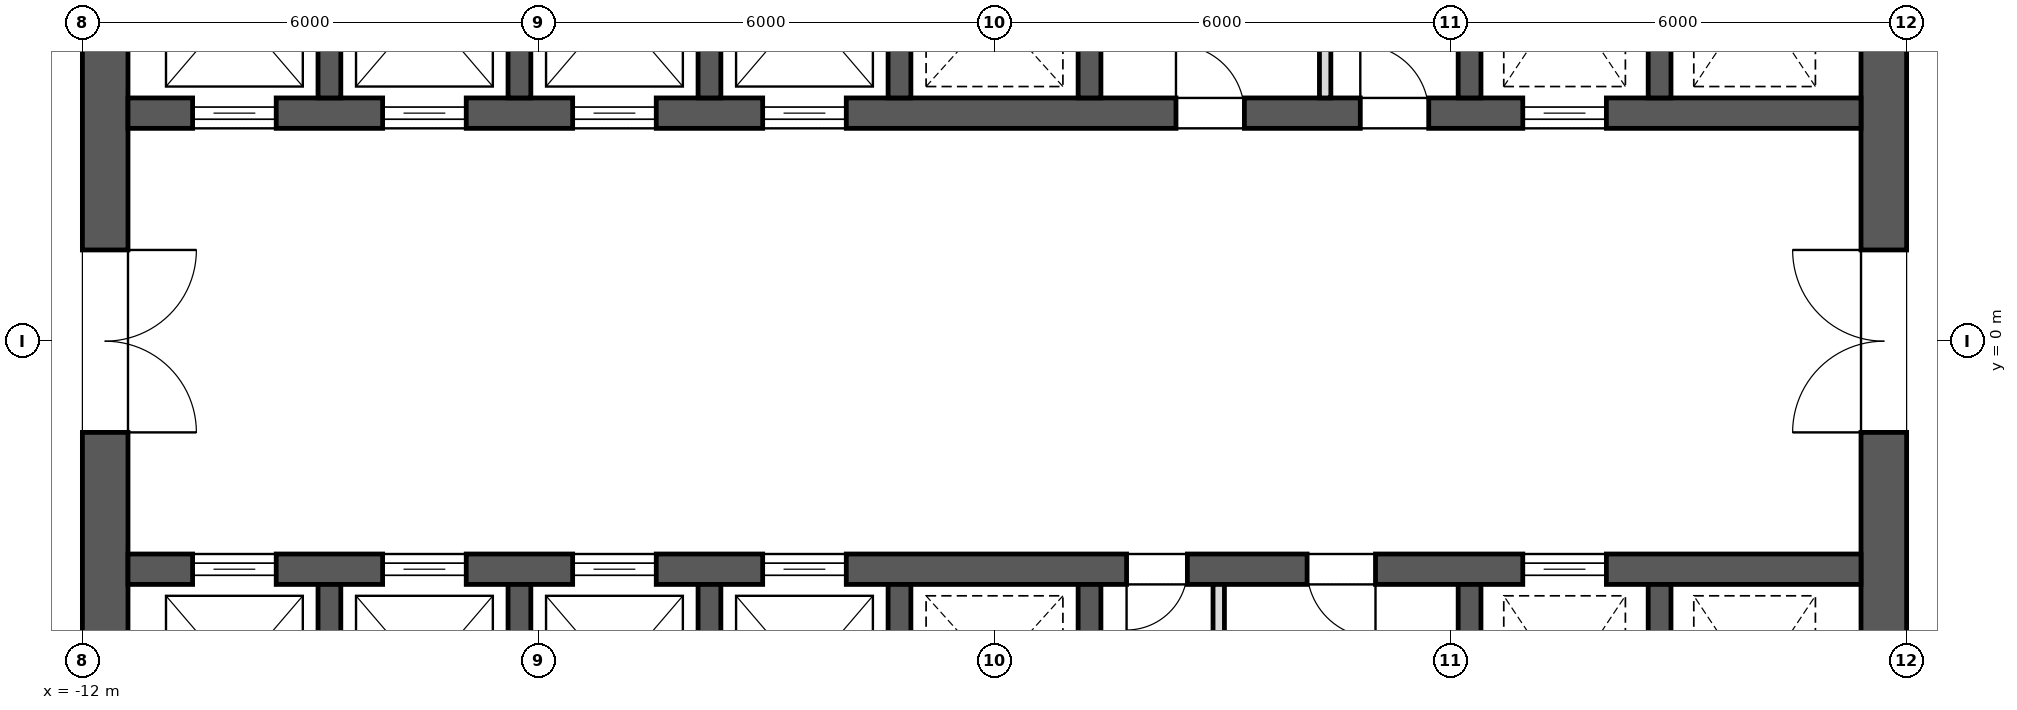
"""IFC4 building model, lengths in metres.
Left out: names, types, materials, properties, quantities, classifications, styles, units other than length and angle.
Written with IfcOpenShell. Run it as: python <this file> out.ifc"""

import sys

from ifc_helpers import new_model, si_unit, direction, frame, frame_2d, origin, place, context, subcontext, project, spatial, rectangle, extrude, element, fill, save


model = new_model("IFC4")
c1 = context("Model", 3, precision=1e-05, world=origin(), true_north=direction((0.0, 1.0)))
c2 = subcontext(c1, "Body", "Model", "MODEL_VIEW")
j1 = project(units=[si_unit("LENGTHUNIT", "METRE"), si_unit("PLANEANGLEUNIT", "RADIAN")], contexts=[c1])
p1 = place(None, origin())
s1 = spatial("IfcSite", under=j1, at=p1, CompositionType="ELEMENT")
p2 = place(p1, origin())
s2 = spatial("IfcBuilding", under=s1, at=p2, CompositionType="ELEMENT")
p3 = place(p2, frame((0.0, 0.0, 186.9)))
s3 = spatial("IfcBuildingStorey", under=s2, at=p3, CompositionType="ELEMENT", Elevation=186.9)
p4 = place(p3, frame((11.7, -11.4, 0.0), z_axis=(0.0, 0.0, 1.0), x_axis=(0.0, 1.0, 0.0)))
e1 = element("IfcWall", 1, at=p4, inside=s3, PredefinedType="SHEAR", context=c2, shape_type="SweptSolid", body=[
    extrude(rectangle(XDim=22.8, YDim=0.6, at=frame_2d((11.4, 0.0))), origin(), (0.0, 0.0, 1.0), 4.0),
])
p5 = place(p4, frame((10.2, 0.0, 0.0)))
e2 = element("IfcOpeningElement", 2, at=p5, cuts=e1, PredefinedType="OPENING", context=c2, shape_type="SweptSolid", body=[
    extrude(rectangle(XDim=2.4, YDim=2.1, at=frame_2d((1.2, 1.05))), frame((0.0, 0.312, 0.0), z_axis=(0.0, -1.0, 0.0), x_axis=(1.0, 0.0, 0.0)), (0.0, 0.0, 1.0), 0.624),
])
p6 = place(p4, frame((19.5, 0.0, 0.0)))
e3 = element("IfcOpeningElement", 3, at=p6, cuts=e1, PredefinedType="OPENING", context=c2, shape_type="SweptSolid", body=[
    extrude(rectangle(XDim=1.2, YDim=2.1, at=frame_2d((0.6, 1.05))), frame((0.0, 0.312, 0.0), z_axis=(0.0, -1.0, 0.0), x_axis=(1.0, 0.0, 0.0)), (0.0, 0.0, 1.0), 0.624),
])
p7 = place(p4, frame((2.1, 0.0, 0.0)))
e4 = element("IfcOpeningElement", 4, at=p7, cuts=e1, PredefinedType="OPENING", context=c2, shape_type="SweptSolid", body=[
    extrude(rectangle(XDim=1.2, YDim=2.1, at=frame_2d((0.6, 1.05))), frame((0.0, 0.312, 0.0), z_axis=(0.0, -1.0, 0.0), x_axis=(1.0, 0.0, 0.0)), (0.0, 0.0, 1.0), 0.624),
])
p8 = place(p3, frame((-11.7, -11.4, 0.0), z_axis=(0.0, 0.0, 1.0), x_axis=(0.0, 1.0, 0.0)))
e5 = element("IfcWall", 5, at=p8, inside=s3, PredefinedType="SHEAR", context=c2, shape_type="SweptSolid", body=[
    extrude(rectangle(XDim=22.8, YDim=0.6, at=frame_2d((11.4, 0.0))), origin(), (0.0, 0.0, 1.0), 4.0),
])
p9 = place(p8, frame((10.2, 0.0, 0.0)))
e6 = element("IfcOpeningElement", 6, at=p9, cuts=e5, PredefinedType="OPENING", context=c2, shape_type="SweptSolid", body=[
    extrude(rectangle(XDim=2.4, YDim=2.1, at=frame_2d((1.2, 1.05))), frame((0.0, 0.312, 0.0), z_axis=(0.0, -1.0, 0.0), x_axis=(1.0, 0.0, 0.0)), (0.0, 0.0, 1.0), 0.624),
])
p10 = place(p8, frame((18.925, 0.0, 0.0)))
e7 = element("IfcOpeningElement", 7, at=p10, cuts=e5, PredefinedType="OPENING", context=c2, shape_type="SweptSolid", body=[
    extrude(rectangle(XDim=1.2, YDim=2.1, at=frame_2d((0.6, 1.05))), frame((0.0, 0.312, 0.0), z_axis=(0.0, -1.0, 0.0), x_axis=(1.0, 0.0, 0.0)), (0.0, 0.0, 1.0), 0.624),
])
p11 = place(p8, frame((2.675, 0.0, 0.0)))
e8 = element("IfcOpeningElement", 8, at=p11, cuts=e5, PredefinedType="OPENING", context=c2, shape_type="SweptSolid", body=[
    extrude(rectangle(XDim=1.2, YDim=2.1, at=frame_2d((0.6, 1.05))), frame((0.0, 0.312, 0.0), z_axis=(0.0, -1.0, 0.0), x_axis=(1.0, 0.0, 0.0)), (0.0, 0.0, 1.0), 0.624),
])
p12 = place(p3, frame((-11.4, 3.0, 0.0), z_axis=(0.0, 0.0, 1.0), x_axis=(1.0, 0.0, 0.0)))
e9 = element("IfcWall", 9, at=p12, inside=s3, PredefinedType="SHEAR", context=c2, shape_type="SweptSolid", body=[
    extrude(rectangle(XDim=22.8, YDim=0.4, at=frame_2d((11.4, 0.0))), origin(), (0.0, 0.0, 1.0), 4.0),
])
p13 = place(p12, frame((0.85, 0.0, 0.0)))
e10 = element("IfcOpeningElement", 10, at=p13, cuts=e9, PredefinedType="OPENING", context=c2, shape_type="SweptSolid", body=[
    extrude(rectangle(XDim=1.1, YDim=2.1, at=frame_2d((0.55, 1.05))), frame((0.0, 0.212, 0.0), z_axis=(0.0, -1.0, 0.0), x_axis=(1.0, 0.0, 0.0)), (0.0, 0.0, 1.0), 0.424),
])
p14 = place(p12, frame((3.35, 0.0, 0.0)))
e11 = element("IfcOpeningElement", 11, at=p14, cuts=e9, PredefinedType="OPENING", context=c2, shape_type="SweptSolid", body=[
    extrude(rectangle(XDim=1.1, YDim=2.1, at=frame_2d((0.55, 1.05))), frame((0.0, 0.212, 0.0), z_axis=(0.0, -1.0, 0.0), x_axis=(1.0, 0.0, 0.0)), (0.0, 0.0, 1.0), 0.424),
])
p15 = place(p12, frame((5.85, 0.0, 0.0)))
e12 = element("IfcOpeningElement", 12, at=p15, cuts=e9, PredefinedType="OPENING", context=c2, shape_type="SweptSolid", body=[
    extrude(rectangle(XDim=1.1, YDim=2.1, at=frame_2d((0.55, 1.05))), frame((0.0, 0.212, 0.0), z_axis=(0.0, -1.0, 0.0), x_axis=(1.0, 0.0, 0.0)), (0.0, 0.0, 1.0), 0.424),
])
p16 = place(p12, frame((8.35, 0.0, 0.0)))
e13 = element("IfcOpeningElement", 13, at=p16, cuts=e9, PredefinedType="OPENING", context=c2, shape_type="SweptSolid", body=[
    extrude(rectangle(XDim=1.1, YDim=2.1, at=frame_2d((0.55, 1.05))), frame((0.0, 0.212, 0.0), z_axis=(0.0, -1.0, 0.0), x_axis=(1.0, 0.0, 0.0)), (0.0, 0.0, 1.0), 0.424),
])
p17 = place(p12, frame((18.35, 0.0, 0.0)))
e14 = element("IfcOpeningElement", 14, at=p17, cuts=e9, PredefinedType="OPENING", context=c2, shape_type="SweptSolid", body=[
    extrude(rectangle(XDim=1.1, YDim=2.1, at=frame_2d((0.55, 1.05))), frame((0.0, 0.212, 0.0), z_axis=(0.0, -1.0, 0.0), x_axis=(1.0, 0.0, 0.0)), (0.0, 0.0, 1.0), 0.424),
])
p18 = place(p12, frame((13.788, 0.0, 0.0)))
e15 = element("IfcOpeningElement", 15, at=p18, cuts=e9, PredefinedType="OPENING", context=c2, shape_type="SweptSolid", body=[
    extrude(rectangle(XDim=0.9, YDim=2.1, at=frame_2d((0.45, 1.05))), frame((0.0, 0.212, 0.0), z_axis=(0.0, -1.0, 0.0), x_axis=(1.0, 0.0, 0.0)), (0.0, 0.0, 1.0), 0.424),
])
p19 = place(p12, frame((16.212, 0.0, 0.0)))
e16 = element("IfcOpeningElement", 16, at=p19, cuts=e9, PredefinedType="OPENING", context=c2, shape_type="SweptSolid", body=[
    extrude(rectangle(XDim=0.9, YDim=2.1, at=frame_2d((0.45, 1.05))), frame((0.0, 0.212, 0.0), z_axis=(0.0, -1.0, 0.0), x_axis=(1.0, 0.0, 0.0)), (0.0, 0.0, 1.0), 0.424),
])
for number, where, z_axis, x_axis in (
    (17, (-8.75, 3.2, 0.0), (0.0, 0.0, 1.0), (0.0, 1.0, 0.0)),
    (18, (-6.25, 3.2, 0.0), (0.0, 0.0, 1.0), (0.0, 1.0, 0.0)),
    (19, (-3.75, 3.2, 0.0), (0.0, 0.0, 1.0), (0.0, 1.0, 0.0)),
    (20, (-1.25, 3.2, 0.0), (0.0, 0.0, 1.0), (0.0, 1.0, 0.0)),
    (21, (1.25, 3.2, 0.0), (0.0, 0.0, 1.0), (0.0, 1.0, 0.0)),
    (22, (6.25, 3.2, 0.0), (0.0, 0.0, 1.0), (0.0, 1.0, 0.0)),
    (23, (8.75, 3.2, 0.0), (0.0, 0.0, 1.0), (0.0, 1.0, 0.0)),
):
    element("IfcWall", number, at=place(p3, frame(where, z_axis=z_axis, x_axis=x_axis)), inside=s3, PredefinedType="SHEAR", context=c2, shape_type="SweptSolid", body=[
        extrude(rectangle(XDim=2.9, YDim=0.3, at=frame_2d((1.45, 0.0))), origin(), (0.0, 0.0, 1.0), 4.0),
    ])
p20 = place(p3, frame((-11.4, -3.0, 0.0), z_axis=(0.0, 0.0, 1.0), x_axis=(1.0, 0.0, 0.0)))
e24 = element("IfcWall", 24, at=p20, inside=s3, PredefinedType="SHEAR", context=c2, shape_type="SweptSolid", body=[
    extrude(rectangle(XDim=22.8, YDim=0.4, at=frame_2d((11.4, 0.0))), origin(), (0.0, 0.0, 1.0), 4.0),
])
p21 = place(p20, frame((0.85, 0.0, 0.0)))
e25 = element("IfcOpeningElement", 25, at=p21, cuts=e24, PredefinedType="OPENING", context=c2, shape_type="SweptSolid", body=[
    extrude(rectangle(XDim=1.1, YDim=2.1, at=frame_2d((0.55, 1.05))), frame((0.0, 0.212, 0.0), z_axis=(0.0, -1.0, 0.0), x_axis=(1.0, 0.0, 0.0)), (0.0, 0.0, 1.0), 0.424),
])
p22 = place(p20, frame((3.35, 0.0, 0.0)))
e26 = element("IfcOpeningElement", 26, at=p22, cuts=e24, PredefinedType="OPENING", context=c2, shape_type="SweptSolid", body=[
    extrude(rectangle(XDim=1.1, YDim=2.1, at=frame_2d((0.55, 1.05))), frame((0.0, 0.212, 0.0), z_axis=(0.0, -1.0, 0.0), x_axis=(1.0, 0.0, 0.0)), (0.0, 0.0, 1.0), 0.424),
])
p23 = place(p20, frame((5.85, 0.0, 0.0)))
e27 = element("IfcOpeningElement", 27, at=p23, cuts=e24, PredefinedType="OPENING", context=c2, shape_type="SweptSolid", body=[
    extrude(rectangle(XDim=1.1, YDim=2.1, at=frame_2d((0.55, 1.05))), frame((0.0, 0.212, 0.0), z_axis=(0.0, -1.0, 0.0), x_axis=(1.0, 0.0, 0.0)), (0.0, 0.0, 1.0), 0.424),
])
p24 = place(p20, frame((8.35, 0.0, 0.0)))
e28 = element("IfcOpeningElement", 28, at=p24, cuts=e24, PredefinedType="OPENING", context=c2, shape_type="SweptSolid", body=[
    extrude(rectangle(XDim=1.1, YDim=2.1, at=frame_2d((0.55, 1.05))), frame((0.0, 0.212, 0.0), z_axis=(0.0, -1.0, 0.0), x_axis=(1.0, 0.0, 0.0)), (0.0, 0.0, 1.0), 0.424),
])
p25 = place(p20, frame((18.35, 0.0, 0.0)))
e29 = element("IfcOpeningElement", 29, at=p25, cuts=e24, PredefinedType="OPENING", context=c2, shape_type="SweptSolid", body=[
    extrude(rectangle(XDim=1.1, YDim=2.1, at=frame_2d((0.55, 1.05))), frame((0.0, 0.212, 0.0), z_axis=(0.0, -1.0, 0.0), x_axis=(1.0, 0.0, 0.0)), (0.0, 0.0, 1.0), 0.424),
])
p26 = place(p20, frame((13.137, 0.0, 0.0)))
e30 = element("IfcOpeningElement", 30, at=p26, cuts=e24, PredefinedType="OPENING", context=c2, shape_type="SweptSolid", body=[
    extrude(rectangle(XDim=0.8, YDim=2.1, at=frame_2d((0.4, 1.05))), frame((0.0, 0.212, 0.0), z_axis=(0.0, -1.0, 0.0), x_axis=(1.0, 0.0, 0.0)), (0.0, 0.0, 1.0), 0.424),
])
p27 = place(p20, frame((15.512, 0.0, 0.0)))
e31 = element("IfcOpeningElement", 31, at=p27, cuts=e24, PredefinedType="OPENING", context=c2, shape_type="SweptSolid", body=[
    extrude(rectangle(XDim=0.9, YDim=2.1, at=frame_2d((0.45, 1.05))), frame((0.0, 0.212, 0.0), z_axis=(0.0, -1.0, 0.0), x_axis=(1.0, 0.0, 0.0)), (0.0, 0.0, 1.0), 0.424),
])
for number, where, z_axis, x_axis in (
    (32, (-8.75, -6.1, 0.0), (0.0, 0.0, 1.0), (0.0, 1.0, 0.0)),
    (33, (-6.25, -6.1, 0.0), (0.0, 0.0, 1.0), (0.0, 1.0, 0.0)),
    (34, (-3.75, -6.1, 0.0), (0.0, 0.0, 1.0), (0.0, 1.0, 0.0)),
    (35, (-1.25, -6.1, 0.0), (0.0, 0.0, 1.0), (0.0, 1.0, 0.0)),
    (36, (1.25, -6.1, 0.0), (0.0, 0.0, 1.0), (0.0, 1.0, 0.0)),
    (37, (6.25, -6.1, 0.0), (0.0, 0.0, 1.0), (0.0, 1.0, 0.0)),
    (38, (8.75, -6.1, 0.0), (0.0, 0.0, 1.0), (0.0, 1.0, 0.0)),
):
    element("IfcWall", number, at=place(p3, frame(where, z_axis=z_axis, x_axis=x_axis)), inside=s3, PredefinedType="SHEAR", context=c2, shape_type="SweptSolid", body=[
        extrude(rectangle(XDim=2.9, YDim=0.3, at=frame_2d((1.45, 0.0))), origin(), (0.0, 0.0, 1.0), 4.0),
    ])
for number, where, z_axis, x_axis in (
    (39, (4.35, 3.2, 0.0), (0.0, 0.0, 1.0), (0.0, 1.0, 0.0)),
    (40, (2.95, -6.1, 0.0), (0.0, 0.0, 1.0), (0.0, 1.0, 0.0)),
):
    element("IfcWall", number, at=place(p3, frame(where, z_axis=z_axis, x_axis=x_axis)), inside=s3, PredefinedType="PARTITIONING", context=c2, shape_type="SweptSolid", body=[
        extrude(rectangle(XDim=2.9, YDim=0.15, at=frame_2d((1.45, 0.0))), origin(), (0.0, 0.0, 1.0), 3.7),
    ])
p28 = place(p13, origin())
e41 = element("IfcDoor", 41, at=p28, inside=s3, OperationType="SLIDING_TO_LEFT", PredefinedType="DOOR", context=c2, shape_type="SweptSolid", body=[
    extrude(rectangle(XDim=1.1, YDim=2.1, at=frame_2d((0.55, 1.05))), frame((0.0, 0.025, 0.0), z_axis=(0.0, -1.0, 0.0), x_axis=(1.0, 0.0, 0.0)), (0.0, 0.0, 1.0), 0.05),
])
fill(e10, e41)
p29 = place(p14, origin())
e42 = element("IfcDoor", 42, at=p29, inside=s3, OperationType="SLIDING_TO_LEFT", PredefinedType="DOOR", context=c2, shape_type="SweptSolid", body=[
    extrude(rectangle(XDim=1.1, YDim=2.1, at=frame_2d((0.55, 1.05))), frame((0.0, 0.025, 0.0), z_axis=(0.0, -1.0, 0.0), x_axis=(1.0, 0.0, 0.0)), (0.0, 0.0, 1.0), 0.05),
])
fill(e11, e42)
p30 = place(p21, origin())
e43 = element("IfcDoor", 43, at=p30, inside=s3, OperationType="SLIDING_TO_LEFT", PredefinedType="DOOR", context=c2, shape_type="SweptSolid", body=[
    extrude(rectangle(XDim=1.1, YDim=2.1, at=frame_2d((0.55, 1.05))), frame((0.0, 0.025, 0.0), z_axis=(0.0, -1.0, 0.0), x_axis=(1.0, 0.0, 0.0)), (0.0, 0.0, 1.0), 0.05),
])
fill(e25, e43)
p31 = place(p22, origin())
e44 = element("IfcDoor", 44, at=p31, inside=s3, OperationType="SLIDING_TO_LEFT", PredefinedType="DOOR", context=c2, shape_type="SweptSolid", body=[
    extrude(rectangle(XDim=1.1, YDim=2.1, at=frame_2d((0.55, 1.05))), frame((0.0, 0.025, 0.0), z_axis=(0.0, -1.0, 0.0), x_axis=(1.0, 0.0, 0.0)), (0.0, 0.0, 1.0), 0.05),
])
fill(e26, e44)
p32 = place(p15, origin())
e45 = element("IfcDoor", 45, at=p32, inside=s3, OperationType="SLIDING_TO_LEFT", PredefinedType="DOOR", context=c2, shape_type="SweptSolid", body=[
    extrude(rectangle(XDim=1.1, YDim=2.1, at=frame_2d((0.55, 1.05))), frame((0.0, 0.025, 0.0), z_axis=(0.0, -1.0, 0.0), x_axis=(1.0, 0.0, 0.0)), (0.0, 0.0, 1.0), 0.05),
])
fill(e12, e45)
p33 = place(p16, origin())
e46 = element("IfcDoor", 46, at=p33, inside=s3, OperationType="SLIDING_TO_LEFT", PredefinedType="DOOR", context=c2, shape_type="SweptSolid", body=[
    extrude(rectangle(XDim=1.1, YDim=2.1, at=frame_2d((0.55, 1.05))), frame((0.0, 0.025, 0.0), z_axis=(0.0, -1.0, 0.0), x_axis=(1.0, 0.0, 0.0)), (0.0, 0.0, 1.0), 0.05),
])
fill(e13, e46)
p34 = place(p23, origin())
e47 = element("IfcDoor", 47, at=p34, inside=s3, OperationType="SLIDING_TO_LEFT", PredefinedType="DOOR", context=c2, shape_type="SweptSolid", body=[
    extrude(rectangle(XDim=1.1, YDim=2.1, at=frame_2d((0.55, 1.05))), frame((0.0, 0.025, 0.0), z_axis=(0.0, -1.0, 0.0), x_axis=(1.0, 0.0, 0.0)), (0.0, 0.0, 1.0), 0.05),
])
fill(e27, e47)
p35 = place(p24, origin())
e48 = element("IfcDoor", 48, at=p35, inside=s3, OperationType="SLIDING_TO_LEFT", PredefinedType="DOOR", context=c2, shape_type="SweptSolid", body=[
    extrude(rectangle(XDim=1.1, YDim=2.1, at=frame_2d((0.55, 1.05))), frame((0.0, 0.025, 0.0), z_axis=(0.0, -1.0, 0.0), x_axis=(1.0, 0.0, 0.0)), (0.0, 0.0, 1.0), 0.05),
])
fill(e28, e48)
p36 = place(p17, origin())
e49 = element("IfcDoor", 49, at=p36, inside=s3, OperationType="SLIDING_TO_LEFT", PredefinedType="DOOR", context=c2, shape_type="SweptSolid", body=[
    extrude(rectangle(XDim=1.1, YDim=2.1, at=frame_2d((0.55, 1.05))), frame((0.0, 0.025, 0.0), z_axis=(0.0, -1.0, 0.0), x_axis=(1.0, 0.0, 0.0)), (0.0, 0.0, 1.0), 0.05),
])
fill(e14, e49)
p37 = place(p25, origin())
e50 = element("IfcDoor", 50, at=p37, inside=s3, OperationType="SLIDING_TO_LEFT", PredefinedType="DOOR", context=c2, shape_type="SweptSolid", body=[
    extrude(rectangle(XDim=1.1, YDim=2.1, at=frame_2d((0.55, 1.05))), frame((0.0, 0.025, 0.0), z_axis=(0.0, -1.0, 0.0), x_axis=(1.0, 0.0, 0.0)), (0.0, 0.0, 1.0), 0.05),
])
fill(e29, e50)
p38 = place(p9, frame((2.4, 0.0, 0.0), z_axis=(0.0, 0.0, 1.0), x_axis=(-1.0, 0.0, 0.0)))
e51 = element("IfcDoor", 51, at=p38, inside=s3, OperationType="DOUBLE_DOOR_SINGLE_SWING", PredefinedType="DOOR", context=c2, shape_type="SweptSolid", body=[
    extrude(rectangle(XDim=2.4, YDim=2.1, at=frame_2d((1.2, 1.05))), frame((0.0, 0.025, 0.0), z_axis=(0.0, -1.0, 0.0), x_axis=(1.0, 0.0, 0.0)), (0.0, 0.0, 1.0), 0.05),
])
fill(e6, e51)
p39 = place(p5, origin())
e52 = element("IfcDoor", 52, at=p39, inside=s3, OperationType="DOUBLE_DOOR_SINGLE_SWING", PredefinedType="DOOR", context=c2, shape_type="SweptSolid", body=[
    extrude(rectangle(XDim=2.4, YDim=2.1, at=frame_2d((1.2, 1.05))), frame((0.0, 0.025, 0.0), z_axis=(0.0, -1.0, 0.0), x_axis=(1.0, 0.0, 0.0)), (0.0, 0.0, 1.0), 0.05),
])
fill(e2, e52)
p40 = place(p18, origin())
e53 = element("IfcDoor", 53, at=p40, inside=s3, OperationType="SINGLE_SWING_RIGHT", PredefinedType="DOOR", context=c2, shape_type="SweptSolid", body=[
    extrude(rectangle(XDim=0.9, YDim=2.1, at=frame_2d((0.45, 1.05))), frame((0.0, 0.025, 0.0), z_axis=(0.0, -1.0, 0.0), x_axis=(1.0, 0.0, 0.0)), (0.0, 0.0, 1.0), 0.05),
])
fill(e15, e53)
p41 = place(p19, origin())
e54 = element("IfcDoor", 54, at=p41, inside=s3, OperationType="SINGLE_SWING_RIGHT", PredefinedType="DOOR", context=c2, shape_type="SweptSolid", body=[
    extrude(rectangle(XDim=0.9, YDim=2.1, at=frame_2d((0.45, 1.05))), frame((0.0, 0.025, 0.0), z_axis=(0.0, -1.0, 0.0), x_axis=(1.0, 0.0, 0.0)), (0.0, 0.0, 1.0), 0.05),
])
fill(e16, e54)
p42 = place(p26, frame((0.8, 0.0, 0.0), z_axis=(0.0, 0.0, 1.0), x_axis=(-1.0, 0.0, 0.0)))
e55 = element("IfcDoor", 55, at=p42, inside=s3, OperationType="SINGLE_SWING_LEFT", PredefinedType="DOOR", context=c2, shape_type="SweptSolid", body=[
    extrude(rectangle(XDim=0.8, YDim=2.1, at=frame_2d((0.4, 1.05))), frame((0.0, 0.025, 0.0), z_axis=(0.0, -1.0, 0.0), x_axis=(1.0, 0.0, 0.0)), (0.0, 0.0, 1.0), 0.05),
])
fill(e30, e55)
p43 = place(p27, frame((0.9, 0.0, 0.0), z_axis=(0.0, 0.0, 1.0), x_axis=(-1.0, 0.0, 0.0)))
e56 = element("IfcDoor", 56, at=p43, inside=s3, OperationType="SINGLE_SWING_RIGHT", PredefinedType="DOOR", context=c2, shape_type="SweptSolid", body=[
    extrude(rectangle(XDim=0.9, YDim=2.1, at=frame_2d((0.45, 1.05))), frame((0.0, 0.025, 0.0), z_axis=(0.0, -1.0, 0.0), x_axis=(1.0, 0.0, 0.0)), (0.0, 0.0, 1.0), 0.05),
])
fill(e31, e56)
save(model, sys.argv[1])
